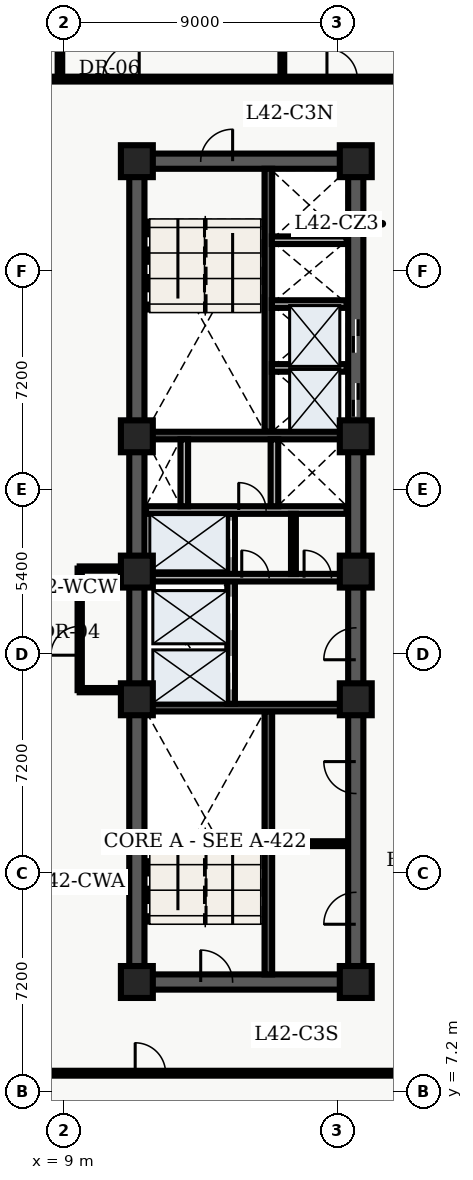
"""IFC4 building model, lengths in metres.
Left out: names, types, materials, properties, quantities, classifications, styles, units other than length and angle.
Written with IfcOpenShell. Run it as: python <this file> out.ifc"""

import sys

from ifc_helpers import new_model, entity, si_unit, converted_unit, direction, frame, origin_with_axes, origin_2d_with_axis, place, context, subcontext, project, spatial, polyline, rectangle, outline, extrude, element, fill, save


model = new_model("IFC4")
c1 = context("Model", 3, precision=1e-05, world=origin_with_axes(), true_north=direction((0.0, 1.0)))
c2 = subcontext(c1, "Body", "Model", "MODEL_VIEW")
j1 = project(units=[si_unit("LENGTHUNIT", "METRE"), converted_unit("PLANEANGLEUNIT", "DEGREE", entity("IfcPlaneAngleMeasure", 0.017), si_unit("PLANEANGLEUNIT", "RADIAN"), dimensions=[0, 0, 0, 0, 0, 0, 0])], contexts=[c1])
p1 = place(None, origin_with_axes())
s1 = spatial("IfcSite", under=j1, at=p1, CompositionType="ELEMENT")
p2 = place(p1, origin_with_axes())
s2 = spatial("IfcBuilding", under=s1, at=p2, CompositionType="ELEMENT")
p3 = place(p2, frame((0.0, 0.0, 171.9), z_axis=(0.0, 0.0, 1.0), x_axis=(1.0, 0.0, 0.0)))
s3 = spatial("IfcBuildingStorey", under=s2, at=p3, CompositionType="ELEMENT", Elevation=171.9)
p4 = place(p3, frame((11.4, 10.8, 0.0), z_axis=(0.0, 0.0, 1.0), x_axis=(0.0, 1.0, 0.0)))
e1 = element("IfcWall", 1, at=p4, inside=s3, PredefinedType="SHEAR", context=c2, shape_type="SweptSolid", body=[
    extrude(outline(polyline([(0.0, -0.25), (27.0, -0.25), (27.0, 0.25), (0.0, 0.25), (0.0, -0.25)])), origin_with_axes(), (0.0, 0.0, 1.0), 3.66),
])
p5 = place(p3, frame((11.4, 10.8, 0.0), z_axis=(0.0, 0.0, 1.0), x_axis=(1.0, 0.0, 0.0)))
e2 = element("IfcWall", 2, at=p5, inside=s3, PredefinedType="SHEAR", context=c2, shape_type="SweptSolid", body=[
    extrude(outline(polyline([(0.0, -0.25), (7.2, -0.25), (7.2, 0.25), (0.0, 0.25), (0.0, -0.25)])), origin_with_axes(), (0.0, 0.0, 1.0), 3.66),
])
p6 = place(p5, frame((2.625, 0.0, 0.0), z_axis=(0.0, 0.0, 1.0), x_axis=(1.0, 0.0, 0.0)))
e3 = element("IfcOpeningElement", 3, at=p6, cuts=e2, PredefinedType="OPENING", context=c2, shape_type="SweptSolid", body=[
    extrude(rectangle(XDim=1.05, YDim=0.52, at=origin_2d_with_axis()), origin_with_axes(), (0.0, 0.0, 1.0), 2.15),
])
p7 = place(p3, frame((11.4, 37.8, 0.0), z_axis=(0.0, 0.0, 1.0), x_axis=(1.0, 0.0, 0.0)))
e4 = element("IfcWall", 4, at=p7, inside=s3, PredefinedType="SHEAR", context=c2, shape_type="SweptSolid", body=[
    extrude(outline(polyline([(0.0, -0.25), (7.2, -0.25), (7.2, 0.25), (0.0, 0.25), (0.0, -0.25)])), origin_with_axes(), (0.0, 0.0, 1.0), 3.66),
])
p8 = place(p7, frame((2.625, 0.0, 0.0), z_axis=(0.0, 0.0, 1.0), x_axis=(1.0, 0.0, 0.0)))
e5 = element("IfcOpeningElement", 5, at=p8, cuts=e4, PredefinedType="OPENING", context=c2, shape_type="SweptSolid", body=[
    extrude(rectangle(XDim=1.05, YDim=0.52, at=origin_2d_with_axis()), origin_with_axes(), (0.0, 0.0, 1.0), 2.15),
])
p9 = place(p3, frame((18.6, 10.8, 0.0), z_axis=(0.0, 0.0, 1.0), x_axis=(0.0, 1.0, 0.0)))
e6 = element("IfcWall", 6, at=p9, inside=s3, PredefinedType="SHEAR", context=c2, shape_type="SweptSolid", body=[
    extrude(outline(polyline([(0.0, -0.25), (13.5, -0.25), (13.5, 0.25), (0.0, 0.25), (0.0, -0.25)])), origin_with_axes(), (0.0, 0.0, 1.0), 3.66),
])
p10 = place(p9, frame((11.125, 0.0, 0.0), z_axis=(0.0, 0.0, 1.0), x_axis=(1.0, 0.0, 0.0)))
e7 = element("IfcOpeningElement", 7, at=p10, cuts=e6, PredefinedType="OPENING", context=c2, shape_type="SweptSolid", body=[
    extrude(rectangle(XDim=1.05, YDim=0.52, at=origin_2d_with_axis()), origin_with_axes(), (0.0, 0.0, 1.0), 2.15),
])
p11 = place(p9, frame((2.425, 0.0, 0.0), z_axis=(0.0, 0.0, 1.0), x_axis=(1.0, 0.0, 0.0)))
e8 = element("IfcOpeningElement", 8, at=p11, cuts=e6, PredefinedType="OPENING", context=c2, shape_type="SweptSolid", body=[
    extrude(rectangle(XDim=1.05, YDim=0.52, at=origin_2d_with_axis()), origin_with_axes(), (0.0, 0.0, 1.0), 2.15),
])
p12 = place(p9, frame((6.725, 0.0, 0.0), z_axis=(0.0, 0.0, 1.0), x_axis=(1.0, 0.0, 0.0)))
e9 = element("IfcOpeningElement", 9, at=p12, cuts=e6, PredefinedType="OPENING", context=c2, shape_type="SweptSolid", body=[
    extrude(rectangle(XDim=1.05, YDim=0.52, at=origin_2d_with_axis()), origin_with_axes(), (0.0, 0.0, 1.0), 2.15),
])
p13 = place(p3, frame((18.6, 24.3, 0.0), z_axis=(0.0, 0.0, 1.0), x_axis=(0.0, 1.0, 0.0)))
e10 = element("IfcWall", 10, at=p13, inside=s3, PredefinedType="SHEAR", context=c2, shape_type="SweptSolid", body=[
    extrude(outline(polyline([(0.0, -0.25), (13.5, -0.25), (13.5, 0.25), (0.0, 0.25), (0.0, -0.25)])), origin_with_axes(), (0.0, 0.0, 1.0), 3.66),
])
p14 = place(p13, frame((5.65, 0.0, 0.0), z_axis=(0.0, 0.0, 1.0), x_axis=(1.0, 0.0, 0.0)))
e11 = element("IfcOpeningElement", 11, at=p14, cuts=e10, PredefinedType="OPENING", context=c2, shape_type="SweptSolid", body=[
    extrude(rectangle(XDim=1.1, YDim=0.52, at=origin_2d_with_axis()), origin_with_axes(), (0.0, 0.0, 1.0), 2.15),
])
p15 = place(p13, frame((7.75, 0.0, 0.0), z_axis=(0.0, 0.0, 1.0), x_axis=(1.0, 0.0, 0.0)))
e12 = element("IfcOpeningElement", 12, at=p15, cuts=e10, PredefinedType="OPENING", context=c2, shape_type="SweptSolid", body=[
    extrude(rectangle(XDim=1.1, YDim=0.52, at=origin_2d_with_axis()), origin_with_axes(), (0.0, 0.0, 1.0), 2.15),
])
p16 = place(p3, frame((15.725, 11.05, 0.0), z_axis=(0.0, 0.0, 1.0), x_axis=(0.0, 1.0, 0.0)))
e13 = element("IfcWall", 13, at=p16, inside=s3, PredefinedType="SHEAR", context=c2, shape_type="SweptSolid", body=[
    extrude(outline(polyline([(0.0, -0.125), (8.65, -0.125), (8.65, 0.125), (0.0, 0.125), (0.0, -0.125)])), origin_with_axes(), (0.0, 0.0, 1.0), 3.66),
])
p17 = place(p3, frame((11.65, 19.825, 0.0), z_axis=(0.0, 0.0, 1.0), x_axis=(1.0, 0.0, 0.0)))
e14 = element("IfcWall", 14, at=p17, inside=s3, PredefinedType="SHEAR", context=c2, shape_type="SweptSolid", body=[
    extrude(outline(polyline([(0.0, -0.125), (6.7, -0.125), (6.7, 0.125), (0.0, 0.125), (0.0, -0.125)])), origin_with_axes(), (0.0, 0.0, 1.0), 3.66),
])
p18 = place(p3, frame((15.725, 28.9, 0.0), z_axis=(0.0, 0.0, 1.0), x_axis=(0.0, 1.0, 0.0)))
e15 = element("IfcWall", 15, at=p18, inside=s3, PredefinedType="SHEAR", context=c2, shape_type="SweptSolid", body=[
    extrude(outline(polyline([(0.0, -0.125), (8.65, -0.125), (8.65, 0.125), (0.0, 0.125), (0.0, -0.125)])), origin_with_axes(), (0.0, 0.0, 1.0), 3.66),
])
p19 = place(p3, frame((11.65, 28.775, 0.0), z_axis=(0.0, 0.0, 1.0), x_axis=(1.0, 0.0, 0.0)))
e16 = element("IfcWall", 16, at=p19, inside=s3, PredefinedType="SHEAR", context=c2, shape_type="SweptSolid", body=[
    extrude(outline(polyline([(0.0, -0.125), (6.7, -0.125), (6.7, 0.125), (0.0, 0.125), (0.0, -0.125)])), origin_with_axes(), (0.0, 0.0, 1.0), 3.66),
])
p20 = place(p3, frame((14.5, 19.95, 0.0), z_axis=(0.0, 0.0, 1.0), x_axis=(0.0, 1.0, 0.0)))
e17 = element("IfcWall", 17, at=p20, inside=s3, PredefinedType="SOLIDWALL", context=c2, shape_type="SweptSolid", body=[
    extrude(outline(polyline([(0.0, -0.125), (6.25, -0.125), (6.25, 0.125), (0.0, 0.125), (0.0, -0.125)])), origin_with_axes(), (0.0, 0.0, 1.0), 2.7),
])
p21 = place(p20, frame((1.025, 0.0, 0.0), z_axis=(0.0, 0.0, 1.0), x_axis=(1.0, 0.0, 0.0)))
e18 = element("IfcOpeningElement", 18, at=p21, cuts=e17, PredefinedType="OPENING", context=c2, shape_type="SweptSolid", body=[
    extrude(rectangle(XDim=1.1, YDim=0.27, at=origin_2d_with_axis()), origin_with_axes(), (0.0, 0.0, 1.0), 2.15),
])
p22 = place(p20, frame((2.975, 0.0, 0.0), z_axis=(0.0, 0.0, 1.0), x_axis=(1.0, 0.0, 0.0)))
e19 = element("IfcOpeningElement", 19, at=p22, cuts=e17, PredefinedType="OPENING", context=c2, shape_type="SweptSolid", body=[
    extrude(rectangle(XDim=1.1, YDim=0.27, at=origin_2d_with_axis()), origin_with_axes(), (0.0, 0.0, 1.0), 2.15),
])
p23 = place(p20, frame((5.425, 0.0, 0.0), z_axis=(0.0, 0.0, 1.0), x_axis=(1.0, 0.0, 0.0)))
e20 = element("IfcOpeningElement", 20, at=p23, cuts=e17, PredefinedType="OPENING", context=c2, shape_type="SweptSolid", body=[
    extrude(rectangle(XDim=1.2, YDim=0.27, at=origin_2d_with_axis()), origin_with_axes(), (0.0, 0.0, 1.0), 2.15),
])
p24 = place(p3, frame((11.7, 24.1, 0.0), z_axis=(0.0, 0.0, 1.0), x_axis=(1.0, 0.0, 0.0)))
e21 = element("IfcWall", 21, at=p24, inside=s3, PredefinedType="SOLIDWALL", context=c2, shape_type="SweptSolid", body=[
    extrude(outline(polyline([(0.0, -0.125), (6.6, -0.125), (6.6, 0.125), (0.0, 0.125), (0.0, -0.125)])), origin_with_axes(), (0.0, 0.0, 1.0), 2.7),
])
p25 = place(p24, frame((3.6, 0.0, 0.0), z_axis=(0.0, 0.0, 1.0), x_axis=(1.0, 0.0, 0.0)))
e22 = element("IfcOpeningElement", 22, at=p25, cuts=e21, PredefinedType="OPENING", context=c2, shape_type="SweptSolid", body=[
    extrude(rectangle(XDim=0.9, YDim=0.27, at=origin_2d_with_axis()), origin_with_axes(), (0.0, 0.0, 1.0), 2.15),
])
p26 = place(p24, frame((5.65, 0.0, 0.0), z_axis=(0.0, 0.0, 1.0), x_axis=(1.0, 0.0, 0.0)))
e23 = element("IfcOpeningElement", 23, at=p26, cuts=e21, PredefinedType="OPENING", context=c2, shape_type="SweptSolid", body=[
    extrude(rectangle(XDim=0.9, YDim=0.27, at=origin_2d_with_axis()), origin_with_axes(), (0.0, 0.0, 1.0), 2.15),
])
p27 = place(p3, frame((11.7, 26.325, 0.0), z_axis=(0.0, 0.0, 1.0), x_axis=(1.0, 0.0, 0.0)))
e24 = element("IfcWall", 24, at=p27, inside=s3, PredefinedType="SOLIDWALL", context=c2, shape_type="SweptSolid", body=[
    extrude(outline(polyline([(0.0, -0.125), (6.6, -0.125), (6.6, 0.125), (0.0, 0.125), (0.0, -0.125)])), origin_with_axes(), (0.0, 0.0, 1.0), 2.7),
])
p28 = place(p27, frame((3.5, 0.0, 0.0), z_axis=(0.0, 0.0, 1.0), x_axis=(1.0, 0.0, 0.0)))
e25 = element("IfcOpeningElement", 25, at=p28, cuts=e24, PredefinedType="OPENING", context=c2, shape_type="SweptSolid", body=[
    extrude(rectangle(XDim=0.9, YDim=0.27, at=origin_2d_with_axis()), origin_with_axes(), (0.0, 0.0, 1.0), 2.15),
])
for number, where, z_axis, x_axis in (
    (26, (12.96, 26.45, 0.0), (0.0, 0.0, 1.0), (0.0, 1.0, 0.0)),
    (27, (15.925, 26.45, 0.0), (0.0, 0.0, 1.0), (0.0, 1.0, 0.0)),
):
    element("IfcWall", number, at=place(p3, frame(where, z_axis=z_axis, x_axis=x_axis)), inside=s3, PredefinedType="SOLIDWALL", context=c2, shape_type="SweptSolid", body=[
        extrude(outline(polyline([(0.0, -0.125), (2.2, -0.125), (2.2, 0.125), (0.0, 0.125), (0.0, -0.125)])), origin_with_axes(), (0.0, 0.0, 1.0), 2.7),
    ])
for number, where, z_axis, x_axis in (
    (28, (11.4, 10.8, 0.0), (0.0, 0.0, 1.0), (1.0, 0.0, 0.0)),
    (29, (11.4, 20.1, 0.0), (0.0, 0.0, 1.0), (1.0, 0.0, 0.0)),
    (30, (11.4, 24.3, 0.0), (0.0, 0.0, 1.0), (1.0, 0.0, 0.0)),
    (31, (11.4, 28.75, 0.0), (0.0, 0.0, 1.0), (1.0, 0.0, 0.0)),
    (32, (11.4, 37.8, 0.0), (0.0, 0.0, 1.0), (1.0, 0.0, 0.0)),
    (33, (18.6, 10.8, 0.0), (0.0, 0.0, 1.0), (1.0, 0.0, 0.0)),
    (34, (18.6, 20.1, 0.0), (0.0, 0.0, 1.0), (1.0, 0.0, 0.0)),
    (35, (18.6, 24.3, 0.0), (0.0, 0.0, 1.0), (1.0, 0.0, 0.0)),
    (36, (18.6, 28.75, 0.0), (0.0, 0.0, 1.0), (1.0, 0.0, 0.0)),
    (37, (18.6, 37.8, 0.0), (0.0, 0.0, 1.0), (1.0, 0.0, 0.0)),
):
    element("IfcColumn", number, at=place(p3, frame(where, z_axis=z_axis, x_axis=x_axis)), inside=s3, PredefinedType="COLUMN", context=c2, shape_type="SweptSolid", body=[
        extrude(rectangle(XDim=1.05, YDim=1.05, at=origin_2d_with_axis()), origin_with_axes(), (0.0, 0.0, 1.0), 3.9),
    ])
p29 = place(p3, frame((16.55, 24.22, 0.0), z_axis=(0.0, 0.0, 1.0), x_axis=(0.0, 1.0, 0.0)))
e38 = element("IfcWall", 38, at=p29, inside=s3, PredefinedType="PARTITIONING", context=c2, shape_type="SweptSolid", body=[
    extrude(outline(polyline([(0.0, -0.08), (1.98, -0.08), (1.98, 0.08), (0.0, 0.08), (0.0, -0.08)])), origin_with_axes(), (0.0, 0.0, 1.0), 2.7),
])
p30 = place(p3, frame((15.84, 15.35, 0.0), z_axis=(0.0, 0.0, 1.0), x_axis=(1.0, 0.0, 0.0)))
e39 = element("IfcWall", 39, at=p30, inside=s3, PredefinedType="PARTITIONING", context=c2, shape_type="SweptSolid", body=[
    extrude(outline(polyline([(0.0, -0.08), (2.46, -0.08), (2.46, 0.08), (0.0, 0.08), (0.0, -0.08)])), origin_with_axes(), (0.0, 0.0, 1.0), 2.7),
])
for number, where, z_axis, x_axis in (
    (40, (15.84, 31.0, 0.0), (0.0, 0.0, 1.0), (1.0, 0.0, 0.0)),
    (41, (15.84, 33.1, 0.0), (0.0, 0.0, 1.0), (1.0, 0.0, 0.0)),
    (42, (15.84, 35.2, 0.0), (0.0, 0.0, 1.0), (1.0, 0.0, 0.0)),
):
    element("IfcWall", number, at=place(p3, frame(where, z_axis=z_axis, x_axis=x_axis)), inside=s3, PredefinedType="SOLIDWALL", context=c2, shape_type="SweptSolid", body=[
        extrude(outline(polyline([(0.0, -0.125), (2.46, -0.125), (2.46, 0.125), (0.0, 0.125), (0.0, -0.125)])), origin_with_axes(), (0.0, 0.0, 1.0), 2.7),
    ])
p31 = place(p3, frame((9.52, 20.4, 0.0), z_axis=(0.0, 0.0, 1.0), x_axis=(0.0, 1.0, 0.0)))
e43 = element("IfcWall", 43, at=p31, inside=s3, PredefinedType="PARTITIONING", context=c2, shape_type="SweptSolid", body=[
    extrude(outline(polyline([(0.0, -0.07), (4.0, -0.07), (4.0, 0.07), (0.0, 0.07), (0.0, -0.07)])), origin_with_axes(), (0.0, 0.0, 1.0), 2.7),
])
p32 = place(p31, frame((1.625, 0.0, 0.0), z_axis=(0.0, 0.0, 1.0), x_axis=(1.0, 0.0, 0.0)))
e44 = element("IfcOpeningElement", 44, at=p32, cuts=e43, PredefinedType="OPENING", context=c2, shape_type="SweptSolid", body=[
    extrude(rectangle(XDim=0.95, YDim=0.16, at=origin_2d_with_axis()), origin_with_axes(), (0.0, 0.0, 1.0), 2.15),
])
for number, where, z_axis, x_axis in (
    (45, (9.52, 20.4, 0.0), (0.0, 0.0, 1.0), (1.0, 0.0, 0.0)),
    (46, (9.52, 24.4, 0.0), (0.0, 0.0, 1.0), (1.0, 0.0, 0.0)),
):
    element("IfcWall", number, at=place(p3, frame(where, z_axis=z_axis, x_axis=x_axis)), inside=s3, PredefinedType="PARTITIONING", context=c2, shape_type="SweptSolid", body=[
        extrude(outline(polyline([(0.0, -0.07), (1.58, -0.07), (1.58, 0.07), (0.0, 0.07), (0.0, -0.07)])), origin_with_axes(), (0.0, 0.0, 1.0), 2.7),
    ])
p33 = place(p3, frame((2.6, 7.8, 0.0), z_axis=(0.0, 0.0, 1.0), x_axis=(1.0, 0.0, 0.0)))
e47 = element("IfcWall", 47, at=p33, inside=s3, PredefinedType="PARTITIONING", context=c2, shape_type="SweptSolid", body=[
    extrude(outline(polyline([(0.0, -0.08), (18.55, -0.08), (18.55, 0.08), (0.0, 0.08), (0.0, -0.08)])), origin_with_axes(), (0.0, 0.0, 1.0), 2.7),
])
p34 = place(p33, frame((9.245, 0.0, 0.0), z_axis=(0.0, 0.0, 1.0), x_axis=(1.0, 0.0, 0.0)))
e48 = element("IfcOpeningElement", 48, at=p34, cuts=e47, PredefinedType="OPENING", context=c2, shape_type="SweptSolid", body=[
    extrude(rectangle(XDim=1.0, YDim=0.18, at=origin_2d_with_axis()), origin_with_axes(), (0.0, 0.0, 1.0), 2.15),
])
p35 = place(p3, frame((2.6, 40.5, 0.0), z_axis=(0.0, 0.0, 1.0), x_axis=(1.0, 0.0, 0.0)))
e49 = element("IfcWall", 49, at=p35, inside=s3, PredefinedType="PARTITIONING", context=c2, shape_type="SweptSolid", body=[
    extrude(outline(polyline([(0.0, -0.08), (21.803, -0.08), (21.803, 0.08), (0.0, 0.08), (0.0, -0.08)])), origin_with_axes(), (0.0, 0.0, 1.0), 2.7),
])
p36 = place(p35, frame((3.13, 0.0, 0.0), z_axis=(0.0, 0.0, 1.0), x_axis=(1.0, 0.0, 0.0)))
e50 = element("IfcOpeningElement", 50, at=p36, cuts=e49, PredefinedType="OPENING", context=c2, shape_type="SweptSolid", body=[
    extrude(rectangle(XDim=1.0, YDim=0.18, at=origin_2d_with_axis()), origin_with_axes(), (0.0, 0.0, 1.0), 2.15),
])
p37 = place(p35, frame((8.277, 0.0, 0.0), z_axis=(0.0, 0.0, 1.0), x_axis=(1.0, 0.0, 0.0)))
e51 = element("IfcOpeningElement", 51, at=p37, cuts=e49, PredefinedType="OPENING", context=c2, shape_type="SweptSolid", body=[
    extrude(rectangle(XDim=1.2, YDim=0.18, at=origin_2d_with_axis()), origin_with_axes(), (0.0, 0.0, 1.0), 2.2),
])
p38 = place(p35, frame((15.553, 0.0, 0.0), z_axis=(0.0, 0.0, 1.0), x_axis=(1.0, 0.0, 0.0)))
e52 = element("IfcOpeningElement", 52, at=p38, cuts=e49, PredefinedType="OPENING", context=c2, shape_type="SweptSolid", body=[
    extrude(rectangle(XDim=1.0, YDim=0.18, at=origin_2d_with_axis()), origin_with_axes(), (0.0, 0.0, 1.0), 2.15),
])
p39 = place(p3, frame((8.87, 40.6, 0.0), z_axis=(0.0, 0.0, 1.0), x_axis=(0.0, 1.0, 0.0)))
e53 = element("IfcWall", 53, at=p39, inside=s3, PredefinedType="PARTITIONING", context=c2, shape_type="SweptSolid", body=[
    extrude(outline(polyline([(0.0, -0.075), (7.665, -0.075), (7.665, 0.075), (0.0, 0.075), (0.0, -0.075)])), origin_with_axes(), (0.0, 0.0, 1.0), 2.7),
])
p40 = place(p3, frame((16.185, 40.6, 0.0), z_axis=(0.0, 0.0, 1.0), x_axis=(0.0, 1.0, 0.0)))
e54 = element("IfcWall", 54, at=p40, inside=s3, PredefinedType="PARTITIONING", context=c2, shape_type="SweptSolid", body=[
    extrude(outline(polyline([(0.0, -0.062), (7.665, -0.062), (7.665, 0.062), (0.0, 0.062), (0.0, -0.062)])), origin_with_axes(), (0.0, 0.0, 1.0), 2.7),
])
p41 = place(p13, frame((5.65, 0.0, 0.0), z_axis=(0.0, 0.0, 1.0), x_axis=(1.0, 0.0, 0.0)))
e55 = element("IfcDoor", 55, at=p41, inside=s3, OperationType="SLIDING_TO_LEFT", PredefinedType="DOOR", context=c2, shape_type="SweptSolid", body=[
    extrude(rectangle(XDim=1.1, YDim=0.09, at=origin_2d_with_axis()), origin_with_axes(), (0.0, 0.0, 1.0), 2.15),
])
fill(e11, e55)
p42 = place(p13, frame((7.75, 0.0, 0.0), z_axis=(0.0, 0.0, 1.0), x_axis=(1.0, 0.0, 0.0)))
e56 = element("IfcDoor", 56, at=p42, inside=s3, OperationType="SLIDING_TO_RIGHT", PredefinedType="DOOR", context=c2, shape_type="SweptSolid", body=[
    extrude(rectangle(XDim=1.1, YDim=0.09, at=origin_2d_with_axis()), origin_with_axes(), (0.0, 0.0, 1.0), 2.15),
])
fill(e12, e56)
p43 = place(p20, frame((1.025, 0.0, 0.0), z_axis=(0.0, 0.0, 1.0), x_axis=(1.0, 0.0, 0.0)))
e57 = element("IfcDoor", 57, at=p43, inside=s3, OperationType="SLIDING_TO_LEFT", PredefinedType="DOOR", context=c2, shape_type="SweptSolid", body=[
    extrude(rectangle(XDim=1.1, YDim=0.09, at=origin_2d_with_axis()), origin_with_axes(), (0.0, 0.0, 1.0), 2.15),
])
fill(e18, e57)
p44 = place(p20, frame((2.975, 0.0, 0.0), z_axis=(0.0, 0.0, 1.0), x_axis=(1.0, 0.0, 0.0)))
e58 = element("IfcDoor", 58, at=p44, inside=s3, OperationType="SLIDING_TO_RIGHT", PredefinedType="DOOR", context=c2, shape_type="SweptSolid", body=[
    extrude(rectangle(XDim=1.1, YDim=0.09, at=origin_2d_with_axis()), origin_with_axes(), (0.0, 0.0, 1.0), 2.15),
])
fill(e19, e58)
p45 = place(p20, frame((5.425, 0.0, 0.0), z_axis=(0.0, 0.0, 1.0), x_axis=(1.0, 0.0, 0.0)))
e59 = element("IfcDoor", 59, at=p45, inside=s3, OperationType="DOUBLE_DOOR_SLIDING", PredefinedType="DOOR", context=c2, shape_type="SweptSolid", body=[
    extrude(rectangle(XDim=1.2, YDim=0.09, at=origin_2d_with_axis()), origin_with_axes(), (0.0, 0.0, 1.0), 2.15),
])
fill(e20, e59)
p46 = place(p5, frame((2.625, 0.0, 0.0), z_axis=(0.0, 0.0, 1.0), x_axis=(1.0, 0.0, 0.0)))
e60 = element("IfcDoor", 60, at=p46, inside=s3, OperationType="SINGLE_SWING_LEFT", PredefinedType="DOOR", context=c2, shape_type="SweptSolid", body=[
    extrude(rectangle(XDim=1.05, YDim=0.09, at=origin_2d_with_axis()), origin_with_axes(), (0.0, 0.0, 1.0), 2.15),
])
fill(e3, e60)
p47 = place(p7, frame((2.625, 0.0, 0.0), z_axis=(0.0, 0.0, 1.0), x_axis=(1.0, 0.0, 0.0)))
e61 = element("IfcDoor", 61, at=p47, inside=s3, OperationType="SINGLE_SWING_RIGHT", PredefinedType="DOOR", context=c2, shape_type="SweptSolid", body=[
    extrude(rectangle(XDim=1.05, YDim=0.09, at=origin_2d_with_axis()), origin_with_axes(), (0.0, 0.0, 1.0), 2.15),
])
fill(e5, e61)
p48 = place(p9, frame((11.125, 0.0, 0.0), z_axis=(0.0, 0.0, 1.0), x_axis=(1.0, 0.0, 0.0)))
e62 = element("IfcDoor", 62, at=p48, inside=s3, OperationType="SINGLE_SWING_LEFT", PredefinedType="DOOR", context=c2, shape_type="SweptSolid", body=[
    extrude(rectangle(XDim=1.05, YDim=0.09, at=origin_2d_with_axis()), origin_with_axes(), (0.0, 0.0, 1.0), 2.15),
])
fill(e7, e62)
p49 = place(p24, frame((3.6, 0.0, 0.0), z_axis=(0.0, 0.0, 1.0), x_axis=(1.0, 0.0, 0.0)))
e63 = element("IfcDoor", 63, at=p49, inside=s3, OperationType="SINGLE_SWING_LEFT", PredefinedType="DOOR", context=c2, shape_type="SweptSolid", body=[
    extrude(rectangle(XDim=0.9, YDim=0.09, at=origin_2d_with_axis()), origin_with_axes(), (0.0, 0.0, 1.0), 2.15),
])
fill(e22, e63)
p50 = place(p24, frame((5.65, 0.0, 0.0), z_axis=(0.0, 0.0, 1.0), x_axis=(1.0, 0.0, 0.0)))
e64 = element("IfcDoor", 64, at=p50, inside=s3, OperationType="SINGLE_SWING_LEFT", PredefinedType="DOOR", context=c2, shape_type="SweptSolid", body=[
    extrude(rectangle(XDim=0.9, YDim=0.09, at=origin_2d_with_axis()), origin_with_axes(), (0.0, 0.0, 1.0), 2.15),
])
fill(e23, e64)
p51 = place(p27, frame((3.5, 0.0, 0.0), z_axis=(0.0, 0.0, 1.0), x_axis=(1.0, 0.0, 0.0)))
e65 = element("IfcDoor", 65, at=p51, inside=s3, OperationType="SINGLE_SWING_LEFT", PredefinedType="DOOR", context=c2, shape_type="SweptSolid", body=[
    extrude(rectangle(XDim=0.9, YDim=0.09, at=origin_2d_with_axis()), origin_with_axes(), (0.0, 0.0, 1.0), 2.15),
])
fill(e25, e65)
p52 = place(p9, frame((2.425, 0.0, 0.0), z_axis=(0.0, 0.0, 1.0), x_axis=(1.0, 0.0, 0.0)))
e66 = element("IfcDoor", 66, at=p52, inside=s3, OperationType="SINGLE_SWING_LEFT", PredefinedType="DOOR", context=c2, shape_type="SweptSolid", body=[
    extrude(rectangle(XDim=1.05, YDim=0.09, at=origin_2d_with_axis()), origin_with_axes(), (0.0, 0.0, 1.0), 2.15),
])
fill(e8, e66)
p53 = place(p9, frame((6.725, 0.0, 0.0), z_axis=(0.0, 0.0, 1.0), x_axis=(1.0, 0.0, 0.0)))
e67 = element("IfcDoor", 67, at=p53, inside=s3, OperationType="SINGLE_SWING_RIGHT", PredefinedType="DOOR", context=c2, shape_type="SweptSolid", body=[
    extrude(rectangle(XDim=1.05, YDim=0.09, at=origin_2d_with_axis()), origin_with_axes(), (0.0, 0.0, 1.0), 2.15),
])
fill(e9, e67)
p54 = place(p31, frame((1.625, 0.0, 0.0), z_axis=(0.0, 0.0, 1.0), x_axis=(1.0, 0.0, 0.0)))
e68 = element("IfcDoor", 68, at=p54, inside=s3, OperationType="SINGLE_SWING_LEFT", PredefinedType="DOOR", context=c2, shape_type="SweptSolid", body=[
    extrude(rectangle(XDim=0.95, YDim=0.084, at=origin_2d_with_axis()), origin_with_axes(), (0.0, 0.0, 1.0), 2.15),
])
fill(e44, e68)
p55 = place(p33, frame((9.245, 0.0, 0.0), z_axis=(0.0, 0.0, 1.0), x_axis=(1.0, 0.0, 0.0)))
e69 = element("IfcDoor", 69, at=p55, inside=s3, OperationType="SINGLE_SWING_LEFT", PredefinedType="DOOR", context=c2, shape_type="SweptSolid", body=[
    extrude(rectangle(XDim=1.0, YDim=0.09, at=origin_2d_with_axis()), origin_with_axes(), (0.0, 0.0, 1.0), 2.15),
])
fill(e48, e69)
p56 = place(p35, frame((8.277, 0.0, 0.0), z_axis=(0.0, 0.0, 1.0), x_axis=(1.0, 0.0, 0.0)))
e70 = element("IfcDoor", 70, at=p56, inside=s3, OperationType="SINGLE_SWING_RIGHT", PredefinedType="DOOR", context=c2, shape_type="SweptSolid", body=[
    extrude(rectangle(XDim=1.2, YDim=0.09, at=origin_2d_with_axis()), origin_with_axes(), (0.0, 0.0, 1.0), 2.2),
])
fill(e51, e70)
p57 = place(p35, frame((15.553, 0.0, 0.0), z_axis=(0.0, 0.0, 1.0), x_axis=(1.0, 0.0, 0.0)))
e71 = element("IfcDoor", 71, at=p57, inside=s3, OperationType="SINGLE_SWING_LEFT", PredefinedType="DOOR", context=c2, shape_type="SweptSolid", body=[
    extrude(rectangle(XDim=1.0, YDim=0.09, at=origin_2d_with_axis()), origin_with_axes(), (0.0, 0.0, 1.0), 2.15),
])
fill(e52, e71)
save(model, sys.argv[1])
